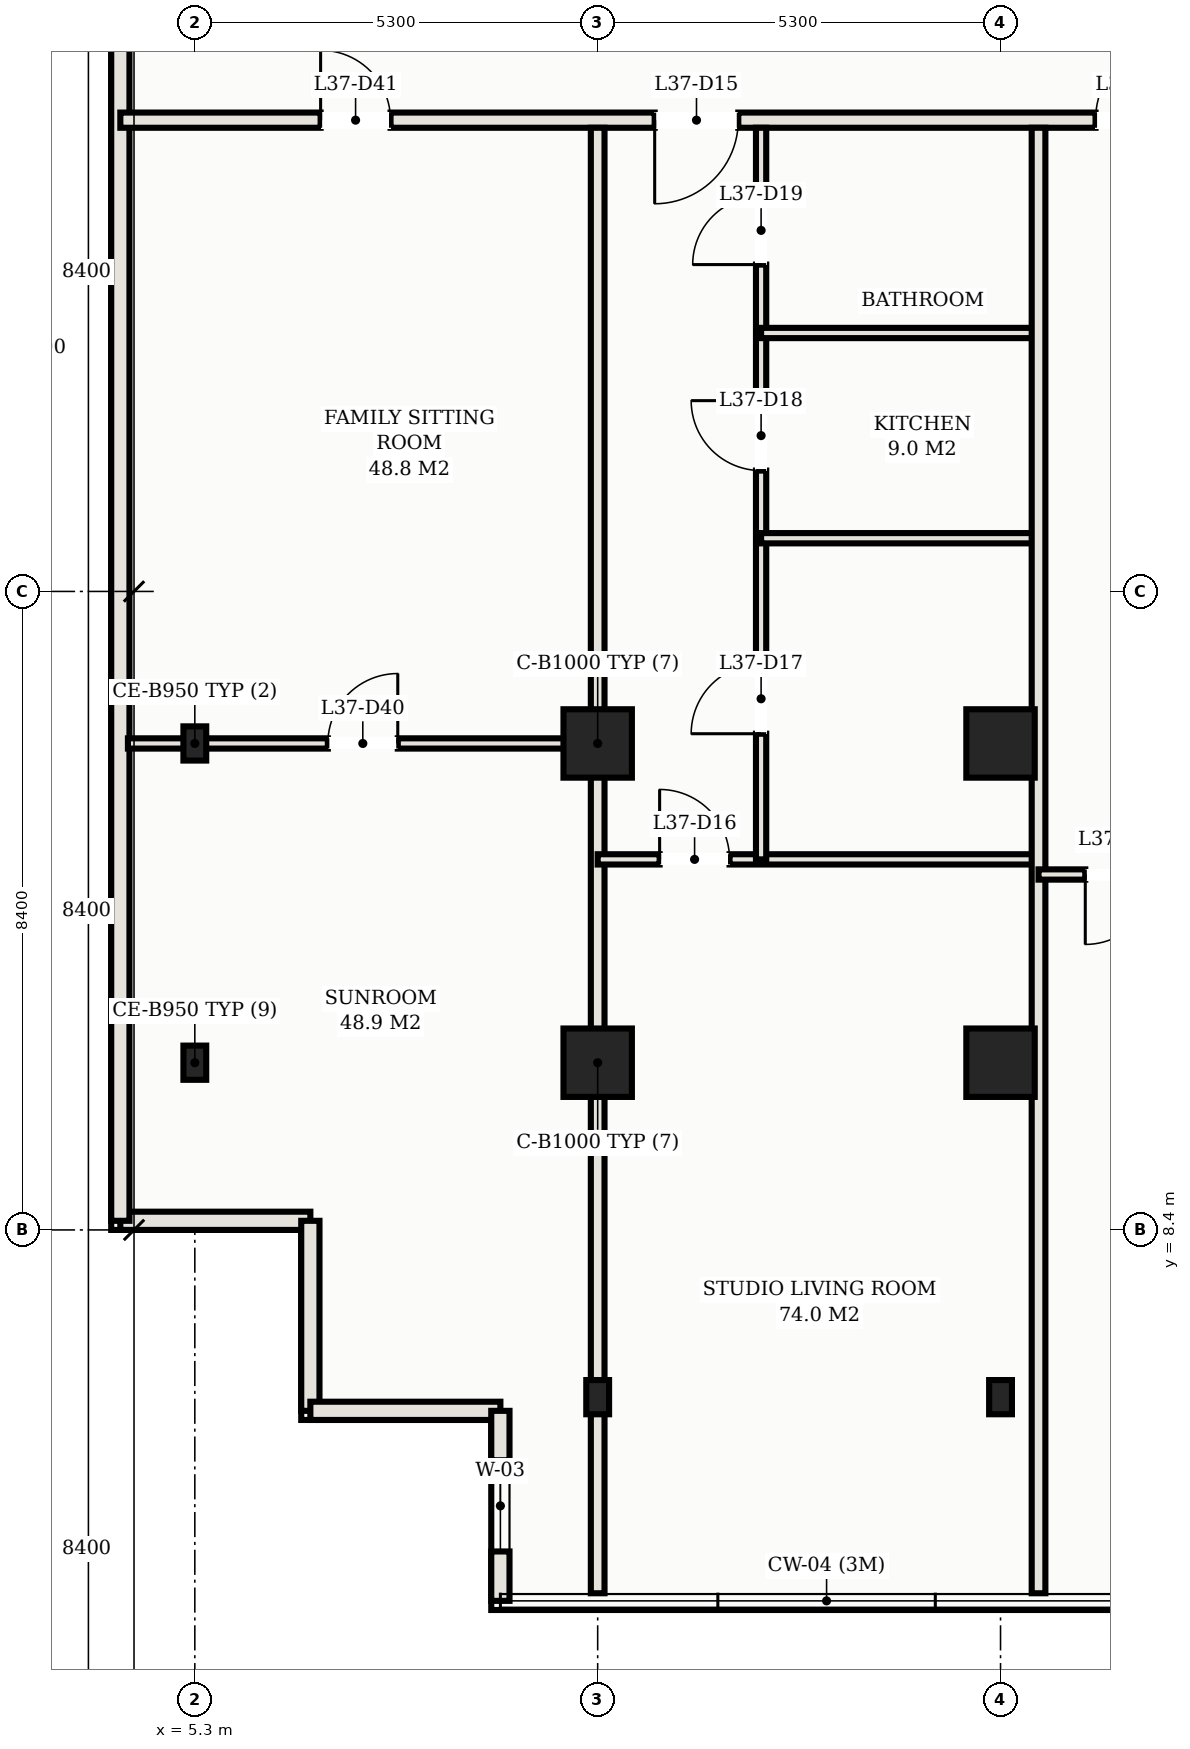
"""IFC4 building model, lengths in metres.
Left out: names, types, materials, properties, quantities, classifications, styles, units other than length and angle.
Written with IfcOpenShell. Run it as: python <this file> out.ifc"""

import sys

from ifc_helpers import new_model, si_unit, direction, frame, frame_2d, origin, origin_2d, place, context, subcontext, project, spatial, rectangle, hollow_rectangle, extrude, element, fill, save


model = new_model("IFC4")
c1 = context("Model", 3, precision=1e-05, world=origin(), true_north=direction((0.0, 1.0)))
c2 = subcontext(c1, "Body", "Model", "MODEL_VIEW")
j1 = project(units=[si_unit("LENGTHUNIT", "METRE"), si_unit("PLANEANGLEUNIT", "RADIAN")], contexts=[c1])
p1 = place(None, origin())
s1 = spatial("IfcSite", under=j1, at=p1, CompositionType="ELEMENT")
p2 = place(p1, origin())
s2 = spatial("IfcBuilding", under=s1, at=p2, CompositionType="ELEMENT")
p3 = place(p2, frame((0.0, 0.0, 139.2)))
s3 = spatial("IfcBuildingStorey", under=s2, at=p3, CompositionType="ELEMENT", Elevation=139.2)
for number, where, z_axis, x_axis in (
    (1, (10.6, 14.8, 0.0), (0.0, 0.0, 1.0), (1.0, 0.0, 0.0)),
    (2, (10.6, 10.6, 0.0), (0.0, 0.0, 1.0), (1.0, 0.0, 0.0)),
    (3, (15.9, 14.8, 0.0), (0.0, 0.0, 1.0), (1.0, 0.0, 0.0)),
    (4, (15.9, 10.6, 0.0), (0.0, 0.0, 1.0), (1.0, 0.0, 0.0)),
):
    element("IfcColumn", number, at=place(p3, frame(where, z_axis=z_axis, x_axis=x_axis)), inside=s3, PredefinedType="COLUMN", context=c2, shape_type="SweptSolid", body=[
        extrude(hollow_rectangle(XDim=0.9, YDim=0.9, WallThickness=0.032, at=origin_2d()), origin(), (0.0, 0.0, 1.0), 3.3),
    ])
for number, where, z_axis, x_axis in (
    (5, (10.6, 6.2, 0.0), (0.0, 0.0, 1.0), (1.0, 0.0, 0.0)),
    (6, (15.9, 6.2, 0.0), (0.0, 0.0, 1.0), (1.0, 0.0, 0.0)),
    (7, (5.3, 10.6, 0.0), (0.0, 0.0, 1.0), (1.0, 0.0, 0.0)),
    (8, (5.3, 14.8, 0.0), (0.0, 0.0, 1.0), (1.0, 0.0, 0.0)),
):
    element("IfcColumn", number, at=place(p3, frame(where, z_axis=z_axis, x_axis=x_axis)), inside=s3, PredefinedType="COLUMN", context=c2, shape_type="SweptSolid", body=[
        extrude(hollow_rectangle(XDim=0.3, YDim=0.45, WallThickness=0.016, at=origin_2d()), origin(), (0.0, 0.0, 1.0), 3.3),
    ])
for number, where, z_axis, x_axis in (
    (9, (4.32, 8.52, 0.0), (0.0, 0.0, 1.0), (1.0, 0.0, 0.0)),
    (10, (6.82, 8.52, 0.0), (0.0, 0.0, 1.0), (0.0, -1.0, 0.0)),
    (11, (6.82, 6.02, 0.0), (0.0, 0.0, 1.0), (1.0, 0.0, 0.0)),
):
    element("IfcWall", number, at=place(p3, frame(where, z_axis=z_axis, x_axis=x_axis)), inside=s3, PredefinedType="SOLIDWALL", context=c2, shape_type="SweptSolid", body=[
        extrude(rectangle(XDim=2.5, YDim=0.24, at=frame_2d((1.25, 0.0))), origin(), (0.0, 0.0, 1.0), 3.1),
    ])
p4 = place(p3, frame((9.32, 6.02, 0.0), z_axis=(0.0, 0.0, 1.0), x_axis=(0.0, -1.0, 0.0)))
e12 = element("IfcWall", 12, at=p4, inside=s3, PredefinedType="SOLIDWALL", context=c2, shape_type="SweptSolid", body=[
    extrude(rectangle(XDim=2.5, YDim=0.24, at=frame_2d((1.25, 0.0))), origin(), (0.0, 0.0, 1.0), 3.1),
])
p5 = place(p4, frame((0.65, 0.0, 0.75)))
e13 = element("IfcOpeningElement", 13, at=p5, cuts=e12, PredefinedType="OPENING", context=c2, shape_type="SweptSolid", body=[
    extrude(rectangle(XDim=1.2, YDim=1.5, at=frame_2d((0.6, 0.75))), frame((0.0, 0.13, 0.0), z_axis=(0.0, -1.0, 0.0), x_axis=(1.0, 0.0, 0.0)), (0.0, 0.0, 1.0), 0.26),
])
p6 = place(p3, frame((4.32, 35.93, 0.0), z_axis=(0.0, 0.0, 1.0), x_axis=(0.0, -1.0, 0.0)))
e14 = element("IfcWall", 14, at=p6, inside=s3, PredefinedType="SOLIDWALL", context=c2, shape_type="SweptSolid", body=[
    extrude(rectangle(XDim=27.41, YDim=0.24, at=frame_2d((13.705, 0.0))), origin(), (0.0, 0.0, 1.0), 3.1),
])
p7 = place(p3, frame((4.32, 23.0, 0.0), z_axis=(0.0, 0.0, 1.0), x_axis=(1.0, 0.0, 0.0)))
e15 = element("IfcWall", 15, at=p7, inside=s3, PredefinedType="PARTITIONING", context=c2, shape_type="SweptSolid", body=[
    extrude(rectangle(XDim=44.36, YDim=0.2, at=frame_2d((22.18, 0.0))), origin(), (0.0, 0.0, 1.0), 2.38),
])
p8 = place(p7, frame((7.03, 0.0, 0.0)))
e16 = element("IfcOpeningElement", 16, at=p8, cuts=e15, PredefinedType="OPENING", context=c2, shape_type="SweptSolid", body=[
    extrude(rectangle(XDim=1.1, YDim=2.25, at=frame_2d((0.55, 1.125))), frame((0.0, 0.11, 0.0), z_axis=(0.0, -1.0, 0.0), x_axis=(1.0, 0.0, 0.0)), (0.0, 0.0, 1.0), 0.22),
])
p9 = place(p7, frame((12.83, 0.0, 0.0)))
e17 = element("IfcOpeningElement", 17, at=p9, cuts=e15, PredefinedType="OPENING", context=c2, shape_type="SweptSolid", body=[
    extrude(rectangle(XDim=1.1, YDim=2.25, at=frame_2d((0.55, 1.125))), frame((0.0, 0.11, 0.0), z_axis=(0.0, -1.0, 0.0), x_axis=(1.0, 0.0, 0.0)), (0.0, 0.0, 1.0), 0.22),
])
p10 = place(p7, frame((17.63, 0.0, 0.0)))
e18 = element("IfcOpeningElement", 18, at=p10, cuts=e15, PredefinedType="OPENING", context=c2, shape_type="SweptSolid", body=[
    extrude(rectangle(XDim=1.1, YDim=2.25, at=frame_2d((0.55, 1.125))), frame((0.0, 0.11, 0.0), z_axis=(0.0, -1.0, 0.0), x_axis=(1.0, 0.0, 0.0)), (0.0, 0.0, 1.0), 0.22),
])
p11 = place(p7, frame((28.23, 0.0, 0.0)))
e19 = element("IfcOpeningElement", 19, at=p11, cuts=e15, PredefinedType="OPENING", context=c2, shape_type="SweptSolid", body=[
    extrude(rectangle(XDim=1.1, YDim=2.25, at=frame_2d((0.55, 1.125))), frame((0.0, 0.11, 0.0), z_axis=(0.0, -1.0, 0.0), x_axis=(1.0, 0.0, 0.0)), (0.0, 0.0, 1.0), 0.22),
])
p12 = place(p7, frame((2.635, 0.0, 0.0)))
e20 = element("IfcOpeningElement", 20, at=p12, cuts=e15, PredefinedType="OPENING", context=c2, shape_type="SweptSolid", body=[
    extrude(rectangle(XDim=0.92, YDim=2.15, at=frame_2d((0.46, 1.075))), frame((0.0, 0.11, 0.0), z_axis=(0.0, -1.0, 0.0), x_axis=(1.0, 0.0, 0.0)), (0.0, 0.0, 1.0), 0.22),
])
p13 = place(p7, frame((40.805, 0.0, 0.0)))
e21 = element("IfcOpeningElement", 21, at=p13, cuts=e15, PredefinedType="OPENING", context=c2, shape_type="SweptSolid", body=[
    extrude(rectangle(XDim=0.92, YDim=2.15, at=frame_2d((0.46, 1.075))), frame((0.0, 0.11, 0.0), z_axis=(0.0, -1.0, 0.0), x_axis=(1.0, 0.0, 0.0)), (0.0, 0.0, 1.0), 0.22),
])
p14 = place(p3, frame((10.6, 3.62, 0.0), z_axis=(0.0, 0.0, 1.0), x_axis=(0.0, 1.0, 0.0)))
e22 = element("IfcWall", 22, at=p14, inside=s3, PredefinedType="PARTITIONING", context=c2, shape_type="SweptSolid", body=[
    extrude(rectangle(XDim=19.28, YDim=0.18, at=frame_2d((9.64, 0.0))), origin(), (0.0, 0.0, 1.0), 2.38),
])
p15 = place(p3, frame((10.6, 13.275, 0.0), z_axis=(0.0, 0.0, 1.0), x_axis=(1.0, 0.0, 0.0)))
e23 = element("IfcWall", 23, at=p15, inside=s3, PredefinedType="PARTITIONING", context=c2, shape_type="SweptSolid", body=[
    extrude(rectangle(XDim=5.8, YDim=0.135, at=frame_2d((2.9, 0.0))), origin(), (0.0, 0.0, 1.0), 2.38),
])
p16 = place(p15, frame((0.815, 0.0, 0.0)))
e24 = element("IfcOpeningElement", 24, at=p16, cuts=e23, PredefinedType="OPENING", context=c2, shape_type="SweptSolid", body=[
    extrude(rectangle(XDim=0.92, YDim=2.15, at=frame_2d((0.46, 1.075))), frame((0.0, 0.078, 0.0), z_axis=(0.0, -1.0, 0.0), x_axis=(1.0, 0.0, 0.0)), (0.0, 0.0, 1.0), 0.155),
])
p17 = place(p3, frame((12.75, 13.275, 0.0), z_axis=(0.0, 0.0, 1.0), x_axis=(0.0, 1.0, 0.0)))
e25 = element("IfcWall", 25, at=p17, inside=s3, PredefinedType="PARTITIONING", context=c2, shape_type="SweptSolid", body=[
    extrude(rectangle(XDim=9.625, YDim=0.135, at=frame_2d((4.812, 0.0))), origin(), (0.0, 0.0, 1.0), 2.38),
])
p18 = place(p17, frame((1.653, 0.0, 0.0)))
e26 = element("IfcOpeningElement", 26, at=p18, cuts=e25, PredefinedType="OPENING", context=c2, shape_type="SweptSolid", body=[
    extrude(rectangle(XDim=0.92, YDim=2.15, at=frame_2d((0.46, 1.075))), frame((0.0, 0.078, 0.0), z_axis=(0.0, -1.0, 0.0), x_axis=(1.0, 0.0, 0.0)), (0.0, 0.0, 1.0), 0.155),
])
p19 = place(p17, frame((5.115, 0.0, 0.0)))
e27 = element("IfcOpeningElement", 27, at=p19, cuts=e25, PredefinedType="OPENING", context=c2, shape_type="SweptSolid", body=[
    extrude(rectangle(XDim=0.92, YDim=2.15, at=frame_2d((0.46, 1.075))), frame((0.0, 0.078, 0.0), z_axis=(0.0, -1.0, 0.0), x_axis=(1.0, 0.0, 0.0)), (0.0, 0.0, 1.0), 0.155),
])
p20 = place(p17, frame((7.825, 0.0, 0.0)))
e28 = element("IfcOpeningElement", 28, at=p20, cuts=e25, PredefinedType="OPENING", context=c2, shape_type="SweptSolid", body=[
    extrude(rectangle(XDim=0.9, YDim=2.15, at=frame_2d((0.45, 1.075))), frame((0.0, 0.078, 0.0), z_axis=(0.0, -1.0, 0.0), x_axis=(1.0, 0.0, 0.0)), (0.0, 0.0, 1.0), 0.155),
])
for number, where, z_axis, x_axis in (
    (29, (12.75, 17.5, 0.0), (0.0, 0.0, 1.0), (1.0, 0.0, 0.0)),
    (30, (12.75, 20.2, 0.0), (0.0, 0.0, 1.0), (1.0, 0.0, 0.0)),
):
    element("IfcWall", number, at=place(p3, frame(where, z_axis=z_axis, x_axis=x_axis)), inside=s3, PredefinedType="PARTITIONING", context=c2, shape_type="SweptSolid", body=[
        extrude(rectangle(XDim=3.65, YDim=0.135, at=frame_2d((1.825, 0.0))), origin(), (0.0, 0.0, 1.0), 2.38),
    ])
p21 = place(p3, frame((16.4, 3.62, 0.0), z_axis=(0.0, 0.0, 1.0), x_axis=(0.0, 1.0, 0.0)))
e31 = element("IfcWall", 31, at=p21, inside=s3, PredefinedType="PARTITIONING", context=c2, shape_type="SweptSolid", body=[
    extrude(rectangle(XDim=19.28, YDim=0.18, at=frame_2d((9.64, 0.0))), origin(), (0.0, 0.0, 1.0), 2.38),
])
p22 = place(p3, frame((16.4, 13.076, 0.0), z_axis=(0.0, 0.0, 1.0), x_axis=(1.0, 0.0, 0.0)))
e32 = element("IfcWall", 32, at=p22, inside=s3, PredefinedType="PARTITIONING", context=c2, shape_type="SweptSolid", body=[
    extrude(rectangle(XDim=4.8, YDim=0.135, at=frame_2d((2.4, 0.0))), origin(), (0.0, 0.0, 1.0), 2.38),
])
p23 = place(p22, frame((0.615, 0.0, 0.0)))
e33 = element("IfcOpeningElement", 33, at=p23, cuts=e32, PredefinedType="OPENING", context=c2, shape_type="SweptSolid", body=[
    extrude(rectangle(XDim=0.92, YDim=2.15, at=frame_2d((0.46, 1.075))), frame((0.0, 0.078, 0.0), z_axis=(0.0, -1.0, 0.0), x_axis=(1.0, 0.0, 0.0)), (0.0, 0.0, 1.0), 0.155),
])
p24 = place(p3, frame((4.42, 14.8, 0.0), z_axis=(0.0, 0.0, 1.0), x_axis=(1.0, 0.0, 0.0)))
e34 = element("IfcWall", 34, at=p24, inside=s3, PredefinedType="PARTITIONING", context=c2, shape_type="SweptSolid", body=[
    extrude(rectangle(XDim=6.18, YDim=0.135, at=frame_2d((3.09, 0.0))), origin(), (0.0, 0.0, 1.0), 2.38),
])
p25 = place(p24, frame((2.63, 0.0, 0.0)))
e35 = element("IfcOpeningElement", 35, at=p25, cuts=e34, PredefinedType="OPENING", context=c2, shape_type="SweptSolid", body=[
    extrude(rectangle(XDim=0.92, YDim=2.15, at=frame_2d((0.46, 1.075))), frame((0.0, 0.078, 0.0), z_axis=(0.0, -1.0, 0.0), x_axis=(1.0, 0.0, 0.0)), (0.0, 0.0, 1.0), 0.155),
])
p26 = place(p5, origin())
e36 = element("IfcWindow", 36, at=p26, inside=s3, PartitioningType="SINGLE_PANEL", PredefinedType="WINDOW", context=c2, shape_type="SweptSolid", body=[
    extrude(rectangle(XDim=1.2, YDim=1.5, at=frame_2d((0.6, 0.75))), frame((0.0, 0.03, 0.0), z_axis=(0.0, -1.0, 0.0), x_axis=(1.0, 0.0, 0.0)), (0.0, 0.0, 1.0), 0.06),
])
fill(e13, e36)
p27 = place(p8, frame((1.1, 0.0, 0.0), z_axis=(0.0, 0.0, 1.0), x_axis=(-1.0, 0.0, 0.0)))
e37 = element("IfcDoor", 37, at=p27, inside=s3, OperationType="SINGLE_SWING_RIGHT", PredefinedType="DOOR", context=c2, shape_type="SweptSolid", body=[
    extrude(rectangle(XDim=1.1, YDim=2.25, at=frame_2d((0.55, 1.125))), frame((0.0, 0.025, 0.0), z_axis=(0.0, -1.0, 0.0), x_axis=(1.0, 0.0, 0.0)), (0.0, 0.0, 1.0), 0.05),
])
fill(e16, e37)
p28 = place(p16, origin())
e38 = element("IfcDoor", 38, at=p28, inside=s3, OperationType="SINGLE_SWING_LEFT", PredefinedType="DOOR", context=c2, shape_type="SweptSolid", body=[
    extrude(rectangle(XDim=0.92, YDim=2.15, at=frame_2d((0.46, 1.075))), frame((0.0, 0.025, 0.0), z_axis=(0.0, -1.0, 0.0), x_axis=(1.0, 0.0, 0.0)), (0.0, 0.0, 1.0), 0.05),
])
fill(e24, e38)
p29 = place(p18, origin())
e39 = element("IfcDoor", 39, at=p29, inside=s3, OperationType="SINGLE_SWING_LEFT", PredefinedType="DOOR", context=c2, shape_type="SweptSolid", body=[
    extrude(rectangle(XDim=0.92, YDim=2.15, at=frame_2d((0.46, 1.075))), frame((0.0, 0.025, 0.0), z_axis=(0.0, -1.0, 0.0), x_axis=(1.0, 0.0, 0.0)), (0.0, 0.0, 1.0), 0.05),
])
fill(e26, e39)
p30 = place(p19, origin())
e40 = element("IfcDoor", 40, at=p30, inside=s3, OperationType="SINGLE_SWING_RIGHT", PredefinedType="DOOR", context=c2, shape_type="SweptSolid", body=[
    extrude(rectangle(XDim=0.92, YDim=2.15, at=frame_2d((0.46, 1.075))), frame((0.0, 0.025, 0.0), z_axis=(0.0, -1.0, 0.0), x_axis=(1.0, 0.0, 0.0)), (0.0, 0.0, 1.0), 0.05),
])
fill(e27, e40)
p31 = place(p20, origin())
e41 = element("IfcDoor", 41, at=p31, inside=s3, OperationType="SINGLE_SWING_LEFT", PredefinedType="DOOR", context=c2, shape_type="SweptSolid", body=[
    extrude(rectangle(XDim=0.9, YDim=2.15, at=frame_2d((0.45, 1.075))), frame((0.0, 0.025, 0.0), z_axis=(0.0, -1.0, 0.0), x_axis=(1.0, 0.0, 0.0)), (0.0, 0.0, 1.0), 0.05),
])
fill(e28, e41)
p32 = place(p9, origin())
e42 = element("IfcDoor", 42, at=p32, inside=s3, OperationType="SINGLE_SWING_RIGHT", PredefinedType="DOOR", context=c2, shape_type="SweptSolid", body=[
    extrude(rectangle(XDim=1.1, YDim=2.25, at=frame_2d((0.55, 1.125))), frame((0.0, 0.025, 0.0), z_axis=(0.0, -1.0, 0.0), x_axis=(1.0, 0.0, 0.0)), (0.0, 0.0, 1.0), 0.05),
])
fill(e17, e42)
p33 = place(p23, frame((0.92, 0.0, 0.0), z_axis=(0.0, 0.0, 1.0), x_axis=(-1.0, 0.0, 0.0)))
e43 = element("IfcDoor", 43, at=p33, inside=s3, OperationType="SINGLE_SWING_RIGHT", PredefinedType="DOOR", context=c2, shape_type="SweptSolid", body=[
    extrude(rectangle(XDim=0.92, YDim=2.15, at=frame_2d((0.46, 1.075))), frame((0.0, 0.025, 0.0), z_axis=(0.0, -1.0, 0.0), x_axis=(1.0, 0.0, 0.0)), (0.0, 0.0, 1.0), 0.05),
])
fill(e33, e43)
p34 = place(p25, origin())
e44 = element("IfcDoor", 44, at=p34, inside=s3, OperationType="SINGLE_SWING_RIGHT", PredefinedType="DOOR", context=c2, shape_type="SweptSolid", body=[
    extrude(rectangle(XDim=0.92, YDim=2.15, at=frame_2d((0.46, 1.075))), frame((0.0, 0.025, 0.0), z_axis=(0.0, -1.0, 0.0), x_axis=(1.0, 0.0, 0.0)), (0.0, 0.0, 1.0), 0.05),
])
fill(e35, e44)
p35 = place(p12, origin())
e45 = element("IfcDoor", 45, at=p35, inside=s3, OperationType="SINGLE_SWING_LEFT", PredefinedType="DOOR", context=c2, shape_type="SweptSolid", body=[
    extrude(rectangle(XDim=0.92, YDim=2.15, at=frame_2d((0.46, 1.075))), frame((0.0, 0.025, 0.0), z_axis=(0.0, -1.0, 0.0), x_axis=(1.0, 0.0, 0.0)), (0.0, 0.0, 1.0), 0.05),
])
fill(e20, e45)
save(model, sys.argv[1])
